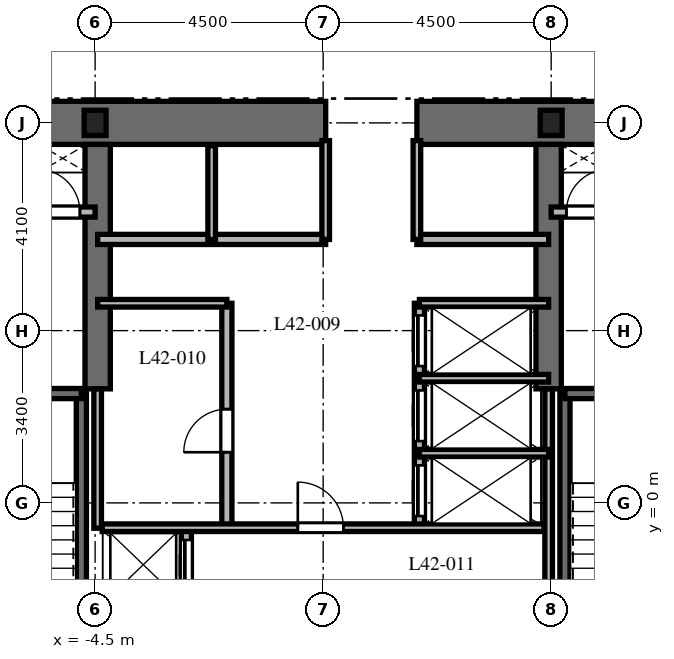
"""IFC4 building model, lengths in metres.
Left out: names, types, materials, properties, quantities, classifications, styles, units other than length and angle.
Written with IfcOpenShell. Run it as: python <this file> out.ifc"""

import sys

from ifc_helpers import new_model, si_unit, direction, frame, frame_2d, origin, origin_2d, place, context, subcontext, project, spatial, rectangle, i_section, extrude, element, fill, save


model = new_model("IFC4")
c1 = context("Model", 3, precision=1e-05, world=origin(), true_north=direction((0.0, 1.0)))
c2 = subcontext(c1, "Body", "Model", "MODEL_VIEW")
j1 = project(units=[si_unit("LENGTHUNIT", "METRE"), si_unit("PLANEANGLEUNIT", "RADIAN")], contexts=[c1])
p1 = place(None, origin())
s1 = spatial("IfcSite", under=j1, at=p1, CompositionType="ELEMENT")
p2 = place(p1, origin())
s2 = spatial("IfcBuilding", under=s1, at=p2, CompositionType="ELEMENT")
p3 = place(p2, frame((0.0, 0.0, 170.2)))
s3 = spatial("IfcBuildingStorey", under=s2, at=p3, CompositionType="ELEMENT", Elevation=170.2)
p4 = place(p3, frame((-9.425, 7.5, 0.0), z_axis=(0.0, 0.0, 1.0), x_axis=(1.0, 0.0, 0.0)))
e1 = element("IfcWall", 1, at=p4, inside=s3, PredefinedType="SHEAR", context=c2, shape_type="SweptSolid", body=[
    extrude(rectangle(XDim=9.475, YDim=0.85, at=frame_2d((4.738, 0.0))), origin(), (0.0, 0.0, 1.0), 5.4),
])
p5 = place(p3, frame((1.85, 7.5, 0.0), z_axis=(0.0, 0.0, 1.0), x_axis=(1.0, 0.0, 0.0)))
e2 = element("IfcWall", 2, at=p5, inside=s3, PredefinedType="SHEAR", context=c2, shape_type="SweptSolid", body=[
    extrude(rectangle(XDim=7.575, YDim=0.85, at=frame_2d((3.788, 0.0))), origin(), (0.0, 0.0, 1.0), 5.4),
])
for number, where, z_axis, x_axis in (
    (3, (-4.45, 2.25, 0.0), (0.0, 0.0, 1.0), (0.0, 1.0, 0.0)),
    (4, (4.45, 2.25, 0.0), (0.0, 0.0, 1.0), (0.0, 1.0, 0.0)),
):
    element("IfcWall", number, at=place(p3, frame(where, z_axis=z_axis, x_axis=x_axis)), inside=s3, PredefinedType="SHEAR", context=c2, shape_type="SweptSolid", body=[
        extrude(rectangle(XDim=4.825, YDim=0.5, at=frame_2d((2.413, 0.0))), origin(), (0.0, 0.0, 1.0), 5.4),
    ])
p6 = place(p3, frame((-4.772, -6.985, 0.0), z_axis=(0.0, 0.0, 1.0), x_axis=(0.0, 1.0, 0.0)))
e5 = element("IfcWall", 5, at=p6, inside=s3, PredefinedType="SHEAR", context=c2, shape_type="SweptSolid", body=[
    extrude(rectangle(XDim=9.143, YDim=0.2, at=frame_2d((4.572, 0.0))), origin(), (0.0, 0.0, 1.0), 5.4),
])
p7 = place(p3, frame((-8.458, 2.158, 0.0), z_axis=(0.0, 0.0, 1.0), x_axis=(1.0, 0.0, 0.0)))
e6 = element("IfcWall", 6, at=p7, inside=s3, PredefinedType="SHEAR", context=c2, shape_type="SweptSolid", body=[
    extrude(rectangle(XDim=3.686, YDim=0.2, at=frame_2d((1.843, 0.0))), origin(), (0.0, 0.0, 1.0), 5.4),
])
p8 = place(p7, frame((1.3, 0.0, 0.0)))
e7 = element("IfcOpeningElement", 7, at=p8, cuts=e6, PredefinedType="OPENING", context=c2, shape_type="SweptSolid", body=[
    extrude(rectangle(XDim=1.0, YDim=2.15, at=frame_2d((0.5, 1.075))), frame((0.0, 0.11, 0.0), z_axis=(0.0, -1.0, 0.0), x_axis=(1.0, 0.0, 0.0)), (0.0, 0.0, 1.0), 0.22),
])
p9 = place(p3, frame((4.772, -6.985, 0.0), z_axis=(0.0, 0.0, 1.0), x_axis=(0.0, 1.0, 0.0)))
e8 = element("IfcWall", 8, at=p9, inside=s3, PredefinedType="SHEAR", context=c2, shape_type="SweptSolid", body=[
    extrude(rectangle(XDim=9.143, YDim=0.2, at=frame_2d((4.572, 0.0))), origin(), (0.0, 0.0, 1.0), 5.4),
])
p10 = place(p3, frame((4.772, 2.158, 0.0), z_axis=(0.0, 0.0, 1.0), x_axis=(1.0, 0.0, 0.0)))
e9 = element("IfcWall", 9, at=p10, inside=s3, PredefinedType="SHEAR", context=c2, shape_type="SweptSolid", body=[
    extrude(rectangle(XDim=3.686, YDim=0.2, at=frame_2d((1.843, 0.0))), origin(), (0.0, 0.0, 1.0), 5.4),
])
p11 = place(p10, frame((1.35, 0.0, 0.0)))
e10 = element("IfcOpeningElement", 10, at=p11, cuts=e9, PredefinedType="OPENING", context=c2, shape_type="SweptSolid", body=[
    extrude(rectangle(XDim=1.0, YDim=2.15, at=frame_2d((0.5, 1.075))), frame((0.0, 0.11, 0.0), z_axis=(0.0, -1.0, 0.0), x_axis=(1.0, 0.0, 0.0)), (0.0, 0.0, 1.0), 0.22),
])
for number, where, z_axis, x_axis in (
    (11, (4.5, 7.5, 0.0), (0.0, 0.0, 1.0), (1.0, 0.0, 0.0)),
    (12, (-4.5, 7.5, 0.0), (0.0, 0.0, 1.0), (1.0, 0.0, 0.0)),
):
    element("IfcColumn", number, at=place(p3, frame(where, z_axis=z_axis, x_axis=x_axis)), inside=s3, PredefinedType="COLUMN", context=c2, shape_type="SweptSolid", body=[
        extrude(i_section(OverallWidth=0.432, OverallDepth=0.498, WebThickness=0.056, FlangeThickness=0.089, at=origin_2d()), origin(), (0.0, 0.0, 1.0), 5.4),
    ])
p12 = place(p3, frame((-8.55, 5.74, 0.0), z_axis=(0.0, 0.0, 1.0), x_axis=(1.0, 0.0, 0.0)))
e13 = element("IfcWall", 13, at=p12, inside=s3, PredefinedType="PARTITIONING", context=c2, shape_type="SweptSolid", body=[
    extrude(rectangle(XDim=4.05, YDim=0.2, at=frame_2d((2.025, 0.0))), origin(), (0.0, 0.0, 1.0), 5.1),
])
p13 = place(p12, frame((0.75, 0.0, 0.0)))
e14 = element("IfcOpeningElement", 14, at=p13, cuts=e13, PredefinedType="OPENING", context=c2, shape_type="SweptSolid", body=[
    extrude(rectangle(XDim=1.1, YDim=2.2, at=frame_2d((0.55, 1.1))), frame((0.0, 0.11, 0.0), z_axis=(0.0, -1.0, 0.0), x_axis=(1.0, 0.0, 0.0)), (0.0, 0.0, 1.0), 0.22),
])
p14 = place(p12, frame((2.9, 0.0, 0.0)))
e15 = element("IfcOpeningElement", 15, at=p14, cuts=e13, PredefinedType="OPENING", context=c2, shape_type="SweptSolid", body=[
    extrude(rectangle(XDim=0.85, YDim=2.03, at=frame_2d((0.425, 1.015))), frame((0.0, 0.11, 0.0), z_axis=(0.0, -1.0, 0.0), x_axis=(1.0, 0.0, 0.0)), (0.0, 0.0, 1.0), 0.22),
])
p15 = place(p3, frame((4.5, 5.74, 0.0), z_axis=(0.0, 0.0, 1.0), x_axis=(1.0, 0.0, 0.0)))
e16 = element("IfcWall", 16, at=p15, inside=s3, PredefinedType="PARTITIONING", context=c2, shape_type="SweptSolid", body=[
    extrude(rectangle(XDim=4.05, YDim=0.2, at=frame_2d((2.025, 0.0))), origin(), (0.0, 0.0, 1.0), 5.1),
])
p16 = place(p15, frame((0.3, 0.0, 0.0)))
e17 = element("IfcOpeningElement", 17, at=p16, cuts=e16, PredefinedType="OPENING", context=c2, shape_type="SweptSolid", body=[
    extrude(rectangle(XDim=0.85, YDim=2.03, at=frame_2d((0.425, 1.015))), frame((0.0, 0.11, 0.0), z_axis=(0.0, -1.0, 0.0), x_axis=(1.0, 0.0, 0.0)), (0.0, 0.0, 1.0), 0.22),
])
p17 = place(p15, frame((2.15, 0.0, 0.0)))
e18 = element("IfcOpeningElement", 18, at=p17, cuts=e16, PredefinedType="OPENING", context=c2, shape_type="SweptSolid", body=[
    extrude(rectangle(XDim=1.1, YDim=2.2, at=frame_2d((0.55, 1.1))), frame((0.0, 0.11, 0.0), z_axis=(0.0, -1.0, 0.0), x_axis=(1.0, 0.0, 0.0)), (0.0, 0.0, 1.0), 0.22),
])
p18 = place(p3, frame((-2.7, -1.972, 0.0), z_axis=(0.0, 0.0, 1.0), x_axis=(0.0, 1.0, 0.0)))
e19 = element("IfcWall", 19, at=p18, inside=s3, PredefinedType="PARTITIONING", context=c2, shape_type="SweptSolid", body=[
    extrude(rectangle(XDim=1.472, YDim=0.2, at=frame_2d((0.736, 0.0))), origin(), (0.0, 0.0, 1.0), 5.1),
])
p19 = place(p18, frame((0.24, 0.0, 0.0)))
e20 = element("IfcOpeningElement", 20, at=p19, cuts=e19, PredefinedType="OPENING", context=c2, shape_type="SweptSolid", body=[
    extrude(rectangle(XDim=1.0, YDim=2.2, at=frame_2d((0.5, 1.1))), frame((0.0, 0.11, 0.0), z_axis=(0.0, -1.0, 0.0), x_axis=(1.0, 0.0, 0.0)), (0.0, 0.0, 1.0), 0.22),
])
p20 = place(p3, frame((-4.45, 5.2, 0.0), z_axis=(0.0, 0.0, 1.0), x_axis=(1.0, 0.0, 0.0)))
e21 = element("IfcWall", 21, at=p20, inside=s3, PredefinedType="PARTITIONING", context=c2, shape_type="SweptSolid", body=[
    extrude(rectangle(XDim=4.5, YDim=0.2, at=frame_2d((2.25, 0.0))), origin(), (0.0, 0.0, 1.0), 5.1),
])
p21 = place(p3, frame((1.85, 5.2, 0.0), z_axis=(0.0, 0.0, 1.0), x_axis=(1.0, 0.0, 0.0)))
e22 = element("IfcWall", 22, at=p21, inside=s3, PredefinedType="PARTITIONING", context=c2, shape_type="SweptSolid", body=[
    extrude(rectangle(XDim=2.6, YDim=0.2, at=frame_2d((1.3, 0.0))), origin(), (0.0, 0.0, 1.0), 5.1),
])
p22 = place(p3, frame((-2.2, 5.2, 0.0), z_axis=(0.0, 0.0, 1.0), x_axis=(0.0, 1.0, 0.0)))
e23 = element("IfcWall", 23, at=p22, inside=s3, PredefinedType="PARTITIONING", context=c2, shape_type="SweptSolid", body=[
    extrude(rectangle(XDim=1.85, YDim=0.15, at=frame_2d((0.925, 0.0))), origin(), (0.0, 0.0, 1.0), 5.1),
])
for number, where, z_axis, x_axis in (
    (24, (0.05, 5.2, 0.0), (0.0, 0.0, 1.0), (0.0, 1.0, 0.0)),
    (25, (1.85, 5.2, 0.0), (0.0, 0.0, 1.0), (0.0, 1.0, 0.0)),
):
    element("IfcWall", number, at=place(p3, frame(where, z_axis=z_axis, x_axis=x_axis)), inside=s3, PredefinedType="PARTITIONING", context=c2, shape_type="SweptSolid", body=[
        extrude(rectangle(XDim=1.95, YDim=0.15, at=frame_2d((0.975, 0.0))), origin(), (0.0, 0.0, 1.0), 5.1),
    ])
p23 = place(p3, frame((-4.45, -0.5, 0.0), z_axis=(0.0, 0.0, 1.0), x_axis=(0.0, 1.0, 0.0)))
e26 = element("IfcWall", 26, at=p23, inside=s3, PredefinedType="PARTITIONING", context=c2, shape_type="SweptSolid", body=[
    extrude(rectangle(XDim=2.75, YDim=0.15, at=frame_2d((1.375, 0.0))), origin(), (0.0, 0.0, 1.0), 5.1),
])
p24 = place(p3, frame((4.45, -1.972, 0.0), z_axis=(0.0, 0.0, 1.0), x_axis=(0.0, 1.0, 0.0)))
e27 = element("IfcWall", 27, at=p24, inside=s3, PredefinedType="PARTITIONING", context=c2, shape_type="SweptSolid", body=[
    extrude(rectangle(XDim=4.222, YDim=0.15, at=frame_2d((2.111, 0.0))), origin(), (0.0, 0.0, 1.0), 5.1),
])
p25 = place(p3, frame((-1.9, -0.5, 0.0), z_axis=(0.0, 0.0, 1.0), x_axis=(0.0, 1.0, 0.0)))
e28 = element("IfcWall", 28, at=p25, inside=s3, PredefinedType="PARTITIONING", context=c2, shape_type="SweptSolid", body=[
    extrude(rectangle(XDim=4.44, YDim=0.2, at=frame_2d((2.22, 0.0))), origin(), (0.0, 0.0, 1.0), 5.1),
])
p26 = place(p25, frame((1.5, 0.0, 0.0)))
e29 = element("IfcOpeningElement", 29, at=p26, cuts=e28, PredefinedType="OPENING", context=c2, shape_type="SweptSolid", body=[
    extrude(rectangle(XDim=0.85, YDim=2.03, at=frame_2d((0.425, 1.015))), frame((0.0, 0.11, 0.0), z_axis=(0.0, -1.0, 0.0), x_axis=(1.0, 0.0, 0.0)), (0.0, 0.0, 1.0), 0.22),
])
p27 = place(p3, frame((-4.45, 3.94, 0.0), z_axis=(0.0, 0.0, 1.0), x_axis=(1.0, 0.0, 0.0)))
e30 = element("IfcWall", 30, at=p27, inside=s3, PredefinedType="PARTITIONING", context=c2, shape_type="SweptSolid", body=[
    extrude(rectangle(XDim=2.55, YDim=0.15, at=frame_2d((1.275, 0.0))), origin(), (0.0, 0.0, 1.0), 5.1),
])
p28 = place(p3, frame((1.9, -0.5, 0.0), z_axis=(0.0, 0.0, 1.0), x_axis=(0.0, 1.0, 0.0)))
e31 = element("IfcWall", 31, at=p28, inside=s3, PredefinedType="PARTITIONING", context=c2, shape_type="SweptSolid", body=[
    extrude(rectangle(XDim=4.44, YDim=0.2, at=frame_2d((2.22, 0.0))), origin(), (0.0, 0.0, 1.0), 5.1),
])
p29 = place(p28, frame((0.24, 0.0, 0.0)))
e32 = element("IfcOpeningElement", 32, at=p29, cuts=e31, PredefinedType="OPENING", context=c2, shape_type="SweptSolid", body=[
    extrude(rectangle(XDim=1.0, YDim=2.2, at=frame_2d((0.5, 1.1))), frame((0.0, 0.11, 0.0), z_axis=(0.0, -1.0, 0.0), x_axis=(1.0, 0.0, 0.0)), (0.0, 0.0, 1.0), 0.22),
])
p30 = place(p28, frame((1.72, 0.0, 0.0)))
e33 = element("IfcOpeningElement", 33, at=p30, cuts=e31, PredefinedType="OPENING", context=c2, shape_type="SweptSolid", body=[
    extrude(rectangle(XDim=1.0, YDim=2.2, at=frame_2d((0.5, 1.1))), frame((0.0, 0.11, 0.0), z_axis=(0.0, -1.0, 0.0), x_axis=(1.0, 0.0, 0.0)), (0.0, 0.0, 1.0), 0.22),
])
p31 = place(p28, frame((3.2, 0.0, 0.0)))
e34 = element("IfcOpeningElement", 34, at=p31, cuts=e31, PredefinedType="OPENING", context=c2, shape_type="SweptSolid", body=[
    extrude(rectangle(XDim=1.0, YDim=2.2, at=frame_2d((0.5, 1.1))), frame((0.0, 0.11, 0.0), z_axis=(0.0, -1.0, 0.0), x_axis=(1.0, 0.0, 0.0)), (0.0, 0.0, 1.0), 0.22),
])
for number, where, z_axis, x_axis in (
    (35, (1.9, 3.94, 0.0), (0.0, 0.0, 1.0), (1.0, 0.0, 0.0)),
    (36, (1.9, 0.98, 0.0), (0.0, 0.0, 1.0), (1.0, 0.0, 0.0)),
    (37, (1.9, 2.46, 0.0), (0.0, 0.0, 1.0), (1.0, 0.0, 0.0)),
):
    element("IfcWall", number, at=place(p3, frame(where, z_axis=z_axis, x_axis=x_axis)), inside=s3, PredefinedType="PARTITIONING", context=c2, shape_type="SweptSolid", body=[
        extrude(rectangle(XDim=2.55, YDim=0.15, at=frame_2d((1.275, 0.0))), origin(), (0.0, 0.0, 1.0), 5.1),
    ])
p32 = place(p3, frame((-4.36, -0.49, 0.0), z_axis=(0.0, 0.0, 1.0), x_axis=(1.0, 0.0, 0.0)))
e38 = element("IfcWall", 38, at=p32, inside=s3, PredefinedType="PARTITIONING", context=c2, shape_type="SweptSolid", body=[
    extrude(rectangle(XDim=8.72, YDim=0.15, at=frame_2d((4.36, 0.0))), origin(), (0.0, 0.0, 1.0), 5.1),
])
p33 = place(p32, frame((3.86, 0.0, 0.0)))
e39 = element("IfcOpeningElement", 39, at=p33, cuts=e38, PredefinedType="OPENING", context=c2, shape_type="SweptSolid", body=[
    extrude(rectangle(XDim=0.9, YDim=2.03, at=frame_2d((0.45, 1.015))), frame((0.0, 0.085, 0.0), z_axis=(0.0, -1.0, 0.0), x_axis=(1.0, 0.0, 0.0)), (0.0, 0.0, 1.0), 0.17),
])
p34 = place(p14, origin())
e40 = element("IfcDoor", 40, at=p34, inside=s3, OperationType="SINGLE_SWING_LEFT", PredefinedType="DOOR", context=c2, shape_type="SweptSolid", body=[
    extrude(rectangle(XDim=0.85, YDim=2.03, at=frame_2d((0.425, 1.015))), frame((0.0, 0.025, 0.0), z_axis=(0.0, -1.0, 0.0), x_axis=(1.0, 0.0, 0.0)), (0.0, 0.0, 1.0), 0.05),
])
fill(e15, e40)
p35 = place(p16, origin())
e41 = element("IfcDoor", 41, at=p35, inside=s3, OperationType="SINGLE_SWING_RIGHT", PredefinedType="DOOR", context=c2, shape_type="SweptSolid", body=[
    extrude(rectangle(XDim=0.85, YDim=2.03, at=frame_2d((0.425, 1.015))), frame((0.0, 0.025, 0.0), z_axis=(0.0, -1.0, 0.0), x_axis=(1.0, 0.0, 0.0)), (0.0, 0.0, 1.0), 0.05),
])
fill(e17, e41)
p36 = place(p19, origin())
e42 = element("IfcDoor", 42, at=p36, inside=s3, OperationType="SLIDING_TO_LEFT", PredefinedType="DOOR", context=c2, shape_type="SweptSolid", body=[
    extrude(rectangle(XDim=1.0, YDim=2.2, at=frame_2d((0.5, 1.1))), frame((0.0, 0.025, 0.0), z_axis=(0.0, -1.0, 0.0), x_axis=(1.0, 0.0, 0.0)), (0.0, 0.0, 1.0), 0.05),
])
fill(e20, e42)
p37 = place(p26, origin())
e43 = element("IfcDoor", 43, at=p37, inside=s3, OperationType="SINGLE_SWING_LEFT", PredefinedType="DOOR", context=c2, shape_type="SweptSolid", body=[
    extrude(rectangle(XDim=0.85, YDim=2.03, at=frame_2d((0.425, 1.015))), frame((0.0, 0.025, 0.0), z_axis=(0.0, -1.0, 0.0), x_axis=(1.0, 0.0, 0.0)), (0.0, 0.0, 1.0), 0.05),
])
fill(e29, e43)
p38 = place(p29, origin())
e44 = element("IfcDoor", 44, at=p38, inside=s3, OperationType="SLIDING_TO_RIGHT", PredefinedType="DOOR", context=c2, shape_type="SweptSolid", body=[
    extrude(rectangle(XDim=1.0, YDim=2.2, at=frame_2d((0.5, 1.1))), frame((0.0, 0.025, 0.0), z_axis=(0.0, -1.0, 0.0), x_axis=(1.0, 0.0, 0.0)), (0.0, 0.0, 1.0), 0.05),
])
fill(e32, e44)
p39 = place(p30, origin())
e45 = element("IfcDoor", 45, at=p39, inside=s3, OperationType="SLIDING_TO_RIGHT", PredefinedType="DOOR", context=c2, shape_type="SweptSolid", body=[
    extrude(rectangle(XDim=1.0, YDim=2.2, at=frame_2d((0.5, 1.1))), frame((0.0, 0.025, 0.0), z_axis=(0.0, -1.0, 0.0), x_axis=(1.0, 0.0, 0.0)), (0.0, 0.0, 1.0), 0.05),
])
fill(e33, e45)
p40 = place(p31, origin())
e46 = element("IfcDoor", 46, at=p40, inside=s3, OperationType="SLIDING_TO_RIGHT", PredefinedType="DOOR", context=c2, shape_type="SweptSolid", body=[
    extrude(rectangle(XDim=1.0, YDim=2.2, at=frame_2d((0.5, 1.1))), frame((0.0, 0.025, 0.0), z_axis=(0.0, -1.0, 0.0), x_axis=(1.0, 0.0, 0.0)), (0.0, 0.0, 1.0), 0.05),
])
fill(e34, e46)
p41 = place(p33, origin())
e47 = element("IfcDoor", 47, at=p41, inside=s3, OperationType="SINGLE_SWING_LEFT", PredefinedType="DOOR", context=c2, shape_type="SweptSolid", body=[
    extrude(rectangle(XDim=0.9, YDim=2.03, at=frame_2d((0.45, 1.015))), frame((0.0, 0.025, 0.0), z_axis=(0.0, -1.0, 0.0), x_axis=(1.0, 0.0, 0.0)), (0.0, 0.0, 1.0), 0.05),
])
fill(e39, e47)
save(model, sys.argv[1])
